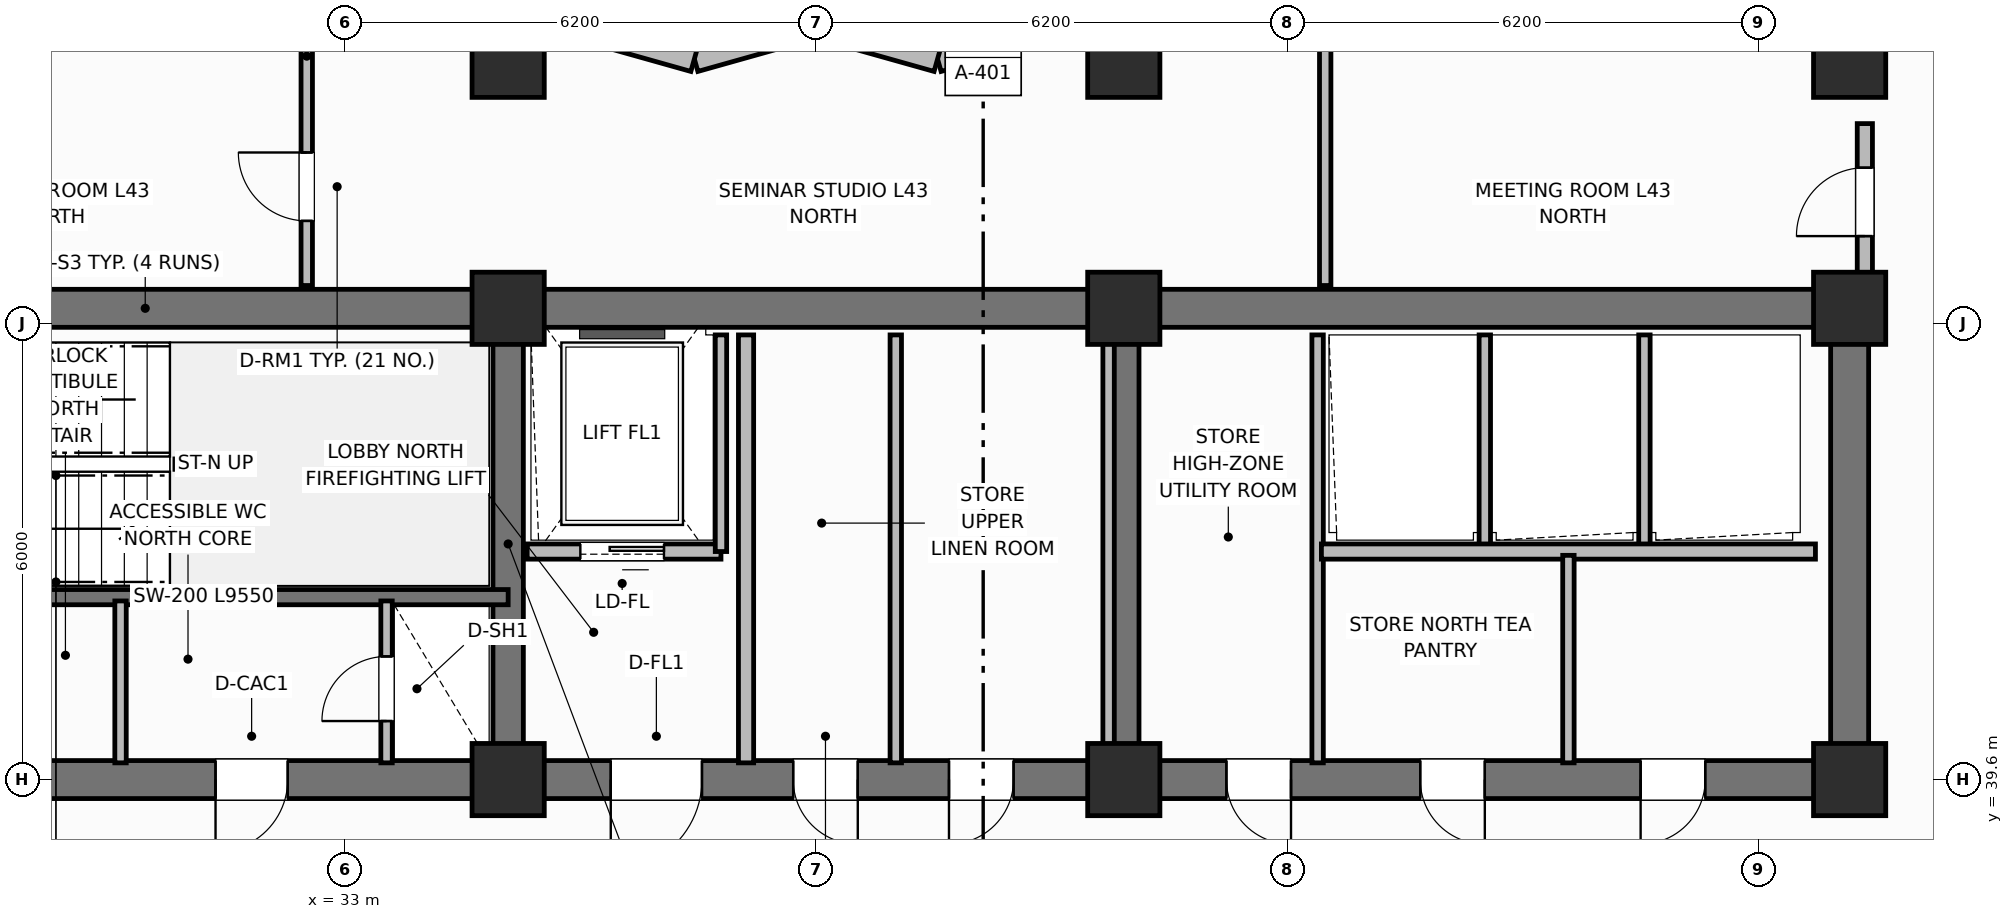
"""IFC4 building model, lengths in metres.
Left out: names, types, materials, properties, quantities, classifications, styles, units other than length and angle.
Written with IfcOpenShell. Run it as: python <this file> out.ifc"""

import sys

from ifc_helpers import new_model, si_unit, direction, frame, frame_2d, origin, origin_2d, place, context, subcontext, project, spatial, rectangle, extrude, element, fill, save


model = new_model("IFC4")
c1 = context("Model", 3, precision=1e-05, world=origin(), true_north=direction((0.0, 1.0)))
c2 = subcontext(c1, "Body", "Model", "MODEL_VIEW")
j1 = project(units=[si_unit("LENGTHUNIT", "METRE"), si_unit("PLANEANGLEUNIT", "RADIAN")], contexts=[c1])
p1 = place(None, origin())
s1 = spatial("IfcSite", under=j1, at=p1, CompositionType="ELEMENT")
p2 = place(p1, origin())
s2 = spatial("IfcBuilding", under=s1, at=p2, CompositionType="ELEMENT")
p3 = place(p2, frame((0.0, 0.0, 173.7)))
s3 = spatial("IfcBuildingStorey", under=s2, at=p3, CompositionType="ELEMENT", Elevation=173.7)
p4 = place(p3, frame((25.6, 45.8, 0.0), z_axis=(0.0, 0.0, 1.0), x_axis=(1.0, 0.0, 0.0)))
e1 = element("IfcWall", 1, at=p4, inside=s3, PredefinedType="SHEAR", context=c2, shape_type="SweptSolid", body=[
    extrude(rectangle(XDim=27.2, YDim=0.5, at=frame_2d((13.6, 0.0))), origin(), (0.0, 0.0, 1.0), 3.7),
])
p5 = place(p3, frame((52.8, 39.85, 0.0), z_axis=(0.0, 0.0, 1.0), x_axis=(0.0, 1.0, 0.0)))
e2 = element("IfcWall", 2, at=p5, inside=s3, PredefinedType="SHEAR", context=c2, shape_type="SweptSolid", body=[
    extrude(rectangle(XDim=5.7, YDim=0.5, at=frame_2d((2.85, 0.0))), origin(), (0.0, 0.0, 1.0), 3.7),
])
p6 = place(p3, frame((52.8, 39.6, 0.0), z_axis=(0.0, 0.0, 1.0), x_axis=(-1.0, 0.0, 0.0)))
e3 = element("IfcWall", 3, at=p6, inside=s3, PredefinedType="SHEAR", context=c2, shape_type="SweptSolid", body=[
    extrude(rectangle(XDim=27.2, YDim=0.5, at=frame_2d((13.6, 0.0))), origin(), (0.0, 0.0, 1.0), 3.7),
])
p7 = place(p6, frame((24.2, 0.0, 0.0)))
e4 = element("IfcOpeningElement", 4, at=p7, cuts=e3, PredefinedType="OPENING", context=c2, shape_type="SweptSolid", body=[
    extrude(rectangle(XDim=1.1, YDim=2.15, at=frame_2d((0.55, 1.075))), frame((0.0, 0.26, 0.0), z_axis=(0.0, -1.0, 0.0), x_axis=(1.0, 0.0, 0.0)), (0.0, 0.0, 1.0), 0.52),
])
p8 = place(p6, frame((20.55, 0.0, 0.0)))
e5 = element("IfcOpeningElement", 5, at=p8, cuts=e3, PredefinedType="OPENING", context=c2, shape_type="SweptSolid", body=[
    extrude(rectangle(XDim=0.95, YDim=2.1, at=frame_2d((0.475, 1.05))), frame((0.0, 0.26, 0.0), z_axis=(0.0, -1.0, 0.0), x_axis=(1.0, 0.0, 0.0)), (0.0, 0.0, 1.0), 0.52),
])
p9 = place(p6, frame((15.1, 0.0, 0.0)))
e6 = element("IfcOpeningElement", 6, at=p9, cuts=e3, PredefinedType="OPENING", context=c2, shape_type="SweptSolid", body=[
    extrude(rectangle(XDim=1.2, YDim=2.15, at=frame_2d((0.6, 1.075))), frame((0.0, 0.26, 0.0), z_axis=(0.0, -1.0, 0.0), x_axis=(1.0, 0.0, 0.0)), (0.0, 0.0, 1.0), 0.52),
])
p10 = place(p6, frame((13.05, 0.0, 0.0)))
e7 = element("IfcOpeningElement", 7, at=p10, cuts=e3, PredefinedType="OPENING", context=c2, shape_type="SweptSolid", body=[
    extrude(rectangle(XDim=0.85, YDim=2.1, at=frame_2d((0.425, 1.05))), frame((0.0, 0.26, 0.0), z_axis=(0.0, -1.0, 0.0), x_axis=(1.0, 0.0, 0.0)), (0.0, 0.0, 1.0), 0.52),
])
p11 = place(p6, frame((11.0, 0.0, 0.0)))
e8 = element("IfcOpeningElement", 8, at=p11, cuts=e3, PredefinedType="OPENING", context=c2, shape_type="SweptSolid", body=[
    extrude(rectangle(XDim=0.85, YDim=2.1, at=frame_2d((0.425, 1.05))), frame((0.0, 0.26, 0.0), z_axis=(0.0, -1.0, 0.0), x_axis=(1.0, 0.0, 0.0)), (0.0, 0.0, 1.0), 0.52),
])
p12 = place(p6, frame((7.35, 0.0, 0.0)))
e9 = element("IfcOpeningElement", 9, at=p12, cuts=e3, PredefinedType="OPENING", context=c2, shape_type="SweptSolid", body=[
    extrude(rectangle(XDim=0.85, YDim=2.1, at=frame_2d((0.425, 1.05))), frame((0.0, 0.26, 0.0), z_axis=(0.0, -1.0, 0.0), x_axis=(1.0, 0.0, 0.0)), (0.0, 0.0, 1.0), 0.52),
])
p13 = place(p6, frame((4.8, 0.0, 0.0)))
e10 = element("IfcOpeningElement", 10, at=p13, cuts=e3, PredefinedType="OPENING", context=c2, shape_type="SweptSolid", body=[
    extrude(rectangle(XDim=0.85, YDim=2.1, at=frame_2d((0.425, 1.05))), frame((0.0, 0.26, 0.0), z_axis=(0.0, -1.0, 0.0), x_axis=(1.0, 0.0, 0.0)), (0.0, 0.0, 1.0), 0.52),
])
p14 = place(p6, frame((1.9, 0.0, 0.0)))
e11 = element("IfcOpeningElement", 11, at=p14, cuts=e3, PredefinedType="OPENING", context=c2, shape_type="SweptSolid", body=[
    extrude(rectangle(XDim=0.85, YDim=2.1, at=frame_2d((0.425, 1.05))), frame((0.0, 0.26, 0.0), z_axis=(0.0, -1.0, 0.0), x_axis=(1.0, 0.0, 0.0)), (0.0, 0.0, 1.0), 0.52),
])
for number, where, z_axis, x_axis in (
    (12, (35.15, 39.85, 0.0), (0.0, 0.0, 1.0), (0.0, 1.0, 0.0)),
    (13, (43.25, 39.85, 0.0), (0.0, 0.0, 1.0), (0.0, 1.0, 0.0)),
):
    element("IfcWall", number, at=place(p3, frame(where, z_axis=z_axis, x_axis=x_axis)), inside=s3, PredefinedType="SHEAR", context=c2, shape_type="SweptSolid", body=[
        extrude(rectangle(XDim=5.7, YDim=0.4, at=frame_2d((2.85, 0.0))), origin(), (0.0, 0.0, 1.0), 3.7),
    ])
for number, where, z_axis, x_axis in (
    (14, (35.15, 39.6, 0.0), (0.0, 0.0, 1.0), (1.0, 0.0, 0.0)),
    (15, (35.15, 45.8, 0.0), (0.0, 0.0, 1.0), (1.0, 0.0, 0.0)),
    (16, (43.25, 39.6, 0.0), (0.0, 0.0, 1.0), (1.0, 0.0, 0.0)),
    (17, (43.25, 45.8, 0.0), (0.0, 0.0, 1.0), (1.0, 0.0, 0.0)),
    (18, (52.8, 39.6, 0.0), (0.0, 0.0, 1.0), (1.0, 0.0, 0.0)),
    (19, (52.8, 45.8, 0.0), (0.0, 0.0, 1.0), (1.0, 0.0, 0.0)),
    (20, (35.15, 49.05, 0.0), (0.0, 0.0, 1.0), (1.0, 0.0, 0.0)),
    (21, (43.25, 49.05, 0.0), (0.0, 0.0, 1.0), (1.0, 0.0, 0.0)),
    (22, (52.8, 49.05, 0.0), (0.0, 0.0, 1.0), (1.0, 0.0, 0.0)),
):
    element("IfcColumn", number, at=place(p3, frame(where, z_axis=z_axis, x_axis=x_axis)), inside=s3, PredefinedType="COLUMN", context=c2, shape_type="SweptSolid", body=[
        extrude(rectangle(XDim=0.95, YDim=0.95, at=origin_2d()), origin(), (0.0, 0.0, 1.0), 3.7),
    ])
p15 = place(p3, frame((42.4, 49.53, 0.0), z_axis=(0.0, 0.0, 1.0), x_axis=(-0.962652136636, -0.270741322725, 0.0)))
e23 = element("IfcWall", 23, at=p15, inside=s3, PredefinedType="SOLIDWALL", context=c2, shape_type="SweptSolid", body=[
    extrude(rectangle(XDim=1.662, YDim=0.34, at=frame_2d((0.831, 0.0))), origin(), (0.0, 0.0, 1.0), 2.72),
])
p16 = place(p3, frame((40.8, 49.08, 0.0), z_axis=(0.0, 0.0, 1.0), x_axis=(-0.962662902433, 0.270703040766, 0.0)))
e24 = element("IfcWall", 24, at=p16, inside=s3, PredefinedType="SOLIDWALL", context=c2, shape_type="SweptSolid", body=[
    extrude(rectangle(XDim=1.662, YDim=0.34, at=frame_2d((0.831, 0.0))), origin(), (0.0, 0.0, 1.0), 2.72),
])
p17 = place(p3, frame((39.2, 49.53, 0.0), z_axis=(0.0, 0.0, 1.0), x_axis=(-0.962652136636, -0.270741322725, 0.0)))
e25 = element("IfcWall", 25, at=p17, inside=s3, PredefinedType="SOLIDWALL", context=c2, shape_type="SweptSolid", body=[
    extrude(rectangle(XDim=1.662, YDim=0.34, at=frame_2d((0.831, 0.0))), origin(), (0.0, 0.0, 1.0), 2.72),
])
p18 = place(p3, frame((37.6, 49.08, 0.0), z_axis=(0.0, 0.0, 1.0), x_axis=(-0.962662902433, 0.270703040766, 0.0)))
e26 = element("IfcWall", 26, at=p18, inside=s3, PredefinedType="SOLIDWALL", context=c2, shape_type="SweptSolid", body=[
    extrude(rectangle(XDim=1.662, YDim=0.34, at=frame_2d((0.831, 0.0))), origin(), (0.0, 0.0, 1.0), 2.72),
])
p19 = place(p3, frame((35.15, 42.0, 0.0), z_axis=(0.0, 0.0, 1.0), x_axis=(-1.0, 0.0, 0.0)))
e27 = element("IfcWall", 27, at=p19, inside=s3, PredefinedType="SHEAR", context=c2, shape_type="SweptSolid", body=[
    extrude(rectangle(XDim=9.55, YDim=0.2, at=frame_2d((4.775, 0.0))), origin(), (0.0, 0.0, 1.0), 3.7),
])
p20 = place(p19, frame((7.25, 0.0, 0.0)))
e28 = element("IfcOpeningElement", 28, at=p20, cuts=e27, PredefinedType="OPENING", context=c2, shape_type="SweptSolid", body=[
    extrude(rectangle(XDim=1.1, YDim=2.15, at=frame_2d((0.55, 1.075))), frame((0.0, 0.11, 0.0), z_axis=(0.0, -1.0, 0.0), x_axis=(1.0, 0.0, 0.0)), (0.0, 0.0, 1.0), 0.22),
])
p21 = place(p3, frame((33.55, 39.82, 0.0), z_axis=(0.0, 0.0, 1.0), x_axis=(0.0, 1.0, 0.0)))
e29 = element("IfcWall", 29, at=p21, inside=s3, PredefinedType="PARTITIONING", context=c2, shape_type="SweptSolid", body=[
    extrude(rectangle(XDim=2.13, YDim=0.15, at=frame_2d((1.065, 0.0))), origin(), (0.0, 0.0, 1.0), 2.55),
])
p22 = place(p21, frame((0.55, 0.0, 0.0)))
e30 = element("IfcOpeningElement", 30, at=p22, cuts=e29, PredefinedType="OPENING", context=c2, shape_type="SweptSolid", body=[
    extrude(rectangle(XDim=0.85, YDim=2.05, at=frame_2d((0.425, 1.025))), frame((0.0, 0.085, 0.0), z_axis=(0.0, -1.0, 0.0), x_axis=(1.0, 0.0, 0.0)), (0.0, 0.0, 1.0), 0.17),
])
p23 = place(p3, frame((30.05, 39.82, 0.0), z_axis=(0.0, 0.0, 1.0), x_axis=(0.0, 1.0, 0.0)))
e31 = element("IfcWall", 31, at=p23, inside=s3, PredefinedType="PARTITIONING", context=c2, shape_type="SweptSolid", body=[
    extrude(rectangle(XDim=2.13, YDim=0.15, at=frame_2d((1.065, 0.0))), origin(), (0.0, 0.0, 1.0), 2.55),
])
p24 = place(p3, frame((37.95, 42.6, 0.0), z_axis=(0.0, 0.0, 1.0), x_axis=(-1.0, 0.0, 0.0)))
e32 = element("IfcWall", 32, at=p24, inside=s3, PredefinedType="PARTITIONING", context=c2, shape_type="SweptSolid", body=[
    extrude(rectangle(XDim=2.55, YDim=0.2, at=frame_2d((1.275, 0.0))), origin(), (0.0, 0.0, 1.0), 2.32),
])
p25 = place(p24, frame((0.75, 0.0, 0.0)))
e33 = element("IfcOpeningElement", 33, at=p25, cuts=e32, PredefinedType="OPENING", context=c2, shape_type="SweptSolid", body=[
    extrude(rectangle(XDim=1.1, YDim=2.15, at=frame_2d((0.55, 1.075))), frame((0.0, 0.11, 0.0), z_axis=(0.0, -1.0, 0.0), x_axis=(1.0, 0.0, 0.0)), (0.0, 0.0, 1.0), 0.22),
])
p26 = place(p3, frame((37.95, 42.6, 0.0), z_axis=(0.0, 0.0, 1.0), x_axis=(0.0, 1.0, 0.0)))
e34 = element("IfcWall", 34, at=p26, inside=s3, PredefinedType="PARTITIONING", context=c2, shape_type="SweptSolid", body=[
    extrude(rectangle(XDim=2.85, YDim=0.15, at=frame_2d((1.425, 0.0))), origin(), (0.0, 0.0, 1.0), 2.55),
])
p27 = place(p3, frame((38.28, 39.82, 0.0), z_axis=(0.0, 0.0, 1.0), x_axis=(0.0, 1.0, 0.0)))
e35 = element("IfcWall", 35, at=p27, inside=s3, PredefinedType="PARTITIONING", context=c2, shape_type="SweptSolid", body=[
    extrude(rectangle(XDim=5.63, YDim=0.2, at=frame_2d((2.815, 0.0))), origin(), (0.0, 0.0, 1.0), 2.55),
])
for number, where, z_axis, x_axis in (
    (36, (43.05, 39.82, 0.0), (0.0, 0.0, 1.0), (0.0, 1.0, 0.0)),
    (37, (40.25, 39.82, 0.0), (0.0, 0.0, 1.0), (0.0, 1.0, 0.0)),
    (38, (45.8, 39.82, 0.0), (0.0, 0.0, 1.0), (0.0, 1.0, 0.0)),
):
    element("IfcWall", number, at=place(p3, frame(where, z_axis=z_axis, x_axis=x_axis)), inside=s3, PredefinedType="PARTITIONING", context=c2, shape_type="SweptSolid", body=[
        extrude(rectangle(XDim=5.63, YDim=0.15, at=frame_2d((2.815, 0.0))), origin(), (0.0, 0.0, 1.0), 2.55),
    ])
for number, where, z_axis, x_axis in (
    (39, (48.0, 42.65, 0.0), (0.0, 0.0, 1.0), (0.0, 1.0, 0.0)),
    (40, (50.1, 42.65, 0.0), (0.0, 0.0, 1.0), (0.0, 1.0, 0.0)),
):
    element("IfcWall", number, at=place(p3, frame(where, z_axis=z_axis, x_axis=x_axis)), inside=s3, PredefinedType="PARTITIONING", context=c2, shape_type="SweptSolid", body=[
        extrude(rectangle(XDim=2.8, YDim=0.15, at=frame_2d((1.4, 0.0))), origin(), (0.0, 0.0, 1.0), 2.55),
    ])
p28 = place(p3, frame((52.35, 42.6, 0.0), z_axis=(0.0, 0.0, 1.0), x_axis=(-1.0, 0.0, 0.0)))
e41 = element("IfcWall", 41, at=p28, inside=s3, PredefinedType="PARTITIONING", context=c2, shape_type="SweptSolid", body=[
    extrude(rectangle(XDim=6.5, YDim=0.2, at=frame_2d((3.25, 0.0))), origin(), (0.0, 0.0, 1.0), 2.55),
])
p29 = place(p3, frame((49.1, 39.82, 0.0), z_axis=(0.0, 0.0, 1.0), x_axis=(0.0, 1.0, 0.0)))
e42 = element("IfcWall", 42, at=p29, inside=s3, PredefinedType="PARTITIONING", context=c2, shape_type="SweptSolid", body=[
    extrude(rectangle(XDim=2.73, YDim=0.15, at=frame_2d((1.365, 0.0))), origin(), (0.0, 0.0, 1.0), 2.55),
])
p30 = place(p3, frame((32.5, 46.1, 0.0), z_axis=(0.0, 0.0, 1.0), x_axis=(0.0, 1.0, 0.0)))
e43 = element("IfcWall", 43, at=p30, inside=s3, PredefinedType="PARTITIONING", context=c2, shape_type="SweptSolid", body=[
    extrude(rectangle(XDim=3.43, YDim=0.15, at=frame_2d((1.715, 0.0))), origin(), (0.0, 0.0, 1.0), 2.55),
])
p31 = place(p30, frame((0.85, 0.0, 0.0)))
e44 = element("IfcOpeningElement", 44, at=p31, cuts=e43, PredefinedType="OPENING", context=c2, shape_type="SweptSolid", body=[
    extrude(rectangle(XDim=0.9, YDim=2.1, at=frame_2d((0.45, 1.05))), frame((0.0, 0.085, 0.0), z_axis=(0.0, -1.0, 0.0), x_axis=(1.0, 0.0, 0.0)), (0.0, 0.0, 1.0), 0.17),
])
p32 = place(p3, frame((45.9, 46.1, 0.0), z_axis=(0.0, 0.0, 1.0), x_axis=(0.0, 1.0, 0.0)))
e45 = element("IfcWall", 45, at=p32, inside=s3, PredefinedType="PARTITIONING", context=c2, shape_type="SweptSolid", body=[
    extrude(rectangle(XDim=3.43, YDim=0.15, at=frame_2d((1.715, 0.0))), origin(), (0.0, 0.0, 1.0), 2.55),
])
p33 = place(p3, frame((53.0, 46.1, 0.0), z_axis=(0.0, 0.0, 1.0), x_axis=(0.0, 1.0, 0.0)))
e46 = element("IfcWall", 46, at=p33, inside=s3, PredefinedType="PARTITIONING", context=c2, shape_type="SweptSolid", body=[
    extrude(rectangle(XDim=2.13, YDim=0.2, at=frame_2d((1.065, 0.0))), origin(), (0.0, 0.0, 1.0), 2.55),
])
p34 = place(p33, frame((0.65, 0.0, 0.0)))
e47 = element("IfcOpeningElement", 47, at=p34, cuts=e46, PredefinedType="OPENING", context=c2, shape_type="SweptSolid", body=[
    extrude(rectangle(XDim=0.9, YDim=2.1, at=frame_2d((0.45, 1.05))), frame((0.0, 0.11, 0.0), z_axis=(0.0, -1.0, 0.0), x_axis=(1.0, 0.0, 0.0)), (0.0, 0.0, 1.0), 0.22),
])
p35 = place(p22, origin())
e48 = element("IfcDoor", 48, at=p35, inside=s3, OperationType="SINGLE_SWING_LEFT", PredefinedType="TRAPDOOR", context=c2, shape_type="SweptSolid", body=[
    extrude(rectangle(XDim=0.85, YDim=2.05, at=frame_2d((0.425, 1.025))), frame((0.0, 0.025, 0.0), z_axis=(0.0, -1.0, 0.0), x_axis=(1.0, 0.0, 0.0)), (0.0, 0.0, 1.0), 0.05),
])
fill(e30, e48)
p36 = place(p25, origin())
e49 = element("IfcDoor", 49, at=p36, inside=s3, OperationType="SLIDING_TO_LEFT", PredefinedType="DOOR", context=c2, shape_type="SweptSolid", body=[
    extrude(rectangle(XDim=1.1, YDim=2.15, at=frame_2d((0.55, 1.075))), frame((0.0, 0.025, 0.0), z_axis=(0.0, -1.0, 0.0), x_axis=(1.0, 0.0, 0.0)), (0.0, 0.0, 1.0), 0.05),
])
fill(e33, e49)
p37 = place(p31, origin())
e50 = element("IfcDoor", 50, at=p37, inside=s3, OperationType="SINGLE_SWING_RIGHT", PredefinedType="DOOR", context=c2, shape_type="SweptSolid", body=[
    extrude(rectangle(XDim=0.9, YDim=2.1, at=frame_2d((0.45, 1.05))), frame((0.0, 0.025, 0.0), z_axis=(0.0, -1.0, 0.0), x_axis=(1.0, 0.0, 0.0)), (0.0, 0.0, 1.0), 0.05),
])
fill(e44, e50)
p38 = place(p34, origin())
e51 = element("IfcDoor", 51, at=p38, inside=s3, OperationType="SINGLE_SWING_LEFT", PredefinedType="DOOR", context=c2, shape_type="SweptSolid", body=[
    extrude(rectangle(XDim=0.9, YDim=2.1, at=frame_2d((0.45, 1.05))), frame((0.0, 0.025, 0.0), z_axis=(0.0, -1.0, 0.0), x_axis=(1.0, 0.0, 0.0)), (0.0, 0.0, 1.0), 0.05),
])
fill(e47, e51)
p39 = place(p8, origin())
e52 = element("IfcDoor", 52, at=p39, inside=s3, OperationType="SINGLE_SWING_RIGHT", PredefinedType="DOOR", context=c2, shape_type="SweptSolid", body=[
    extrude(rectangle(XDim=0.95, YDim=2.1, at=frame_2d((0.475, 1.05))), frame((0.0, 0.025, 0.0), z_axis=(0.0, -1.0, 0.0), x_axis=(1.0, 0.0, 0.0)), (0.0, 0.0, 1.0), 0.05),
])
fill(e5, e52)
p40 = place(p9, origin())
e53 = element("IfcDoor", 53, at=p40, inside=s3, OperationType="SINGLE_SWING_RIGHT", PredefinedType="DOOR", context=c2, shape_type="SweptSolid", body=[
    extrude(rectangle(XDim=1.2, YDim=2.15, at=frame_2d((0.6, 1.075))), frame((0.0, 0.025, 0.0), z_axis=(0.0, -1.0, 0.0), x_axis=(1.0, 0.0, 0.0)), (0.0, 0.0, 1.0), 0.05),
])
fill(e6, e53)
p41 = place(p10, origin())
e54 = element("IfcDoor", 54, at=p41, inside=s3, OperationType="SINGLE_SWING_LEFT", PredefinedType="DOOR", context=c2, shape_type="SweptSolid", body=[
    extrude(rectangle(XDim=0.85, YDim=2.1, at=frame_2d((0.425, 1.05))), frame((0.0, 0.025, 0.0), z_axis=(0.0, -1.0, 0.0), x_axis=(1.0, 0.0, 0.0)), (0.0, 0.0, 1.0), 0.05),
])
fill(e7, e54)
p42 = place(p11, origin())
e55 = element("IfcDoor", 55, at=p42, inside=s3, OperationType="SINGLE_SWING_RIGHT", PredefinedType="DOOR", context=c2, shape_type="SweptSolid", body=[
    extrude(rectangle(XDim=0.85, YDim=2.1, at=frame_2d((0.425, 1.05))), frame((0.0, 0.025, 0.0), z_axis=(0.0, -1.0, 0.0), x_axis=(1.0, 0.0, 0.0)), (0.0, 0.0, 1.0), 0.05),
])
fill(e8, e55)
p43 = place(p12, origin())
e56 = element("IfcDoor", 56, at=p43, inside=s3, OperationType="SINGLE_SWING_LEFT", PredefinedType="DOOR", context=c2, shape_type="SweptSolid", body=[
    extrude(rectangle(XDim=0.85, YDim=2.1, at=frame_2d((0.425, 1.05))), frame((0.0, 0.025, 0.0), z_axis=(0.0, -1.0, 0.0), x_axis=(1.0, 0.0, 0.0)), (0.0, 0.0, 1.0), 0.05),
])
fill(e9, e56)
p44 = place(p13, origin())
e57 = element("IfcDoor", 57, at=p44, inside=s3, OperationType="SINGLE_SWING_LEFT", PredefinedType="DOOR", context=c2, shape_type="SweptSolid", body=[
    extrude(rectangle(XDim=0.85, YDim=2.1, at=frame_2d((0.425, 1.05))), frame((0.0, 0.025, 0.0), z_axis=(0.0, -1.0, 0.0), x_axis=(1.0, 0.0, 0.0)), (0.0, 0.0, 1.0), 0.05),
])
fill(e10, e57)
p45 = place(p14, origin())
e58 = element("IfcDoor", 58, at=p45, inside=s3, OperationType="SINGLE_SWING_RIGHT", PredefinedType="DOOR", context=c2, shape_type="SweptSolid", body=[
    extrude(rectangle(XDim=0.85, YDim=2.1, at=frame_2d((0.425, 1.05))), frame((0.0, 0.025, 0.0), z_axis=(0.0, -1.0, 0.0), x_axis=(1.0, 0.0, 0.0)), (0.0, 0.0, 1.0), 0.05),
])
fill(e11, e58)
save(model, sys.argv[1])
